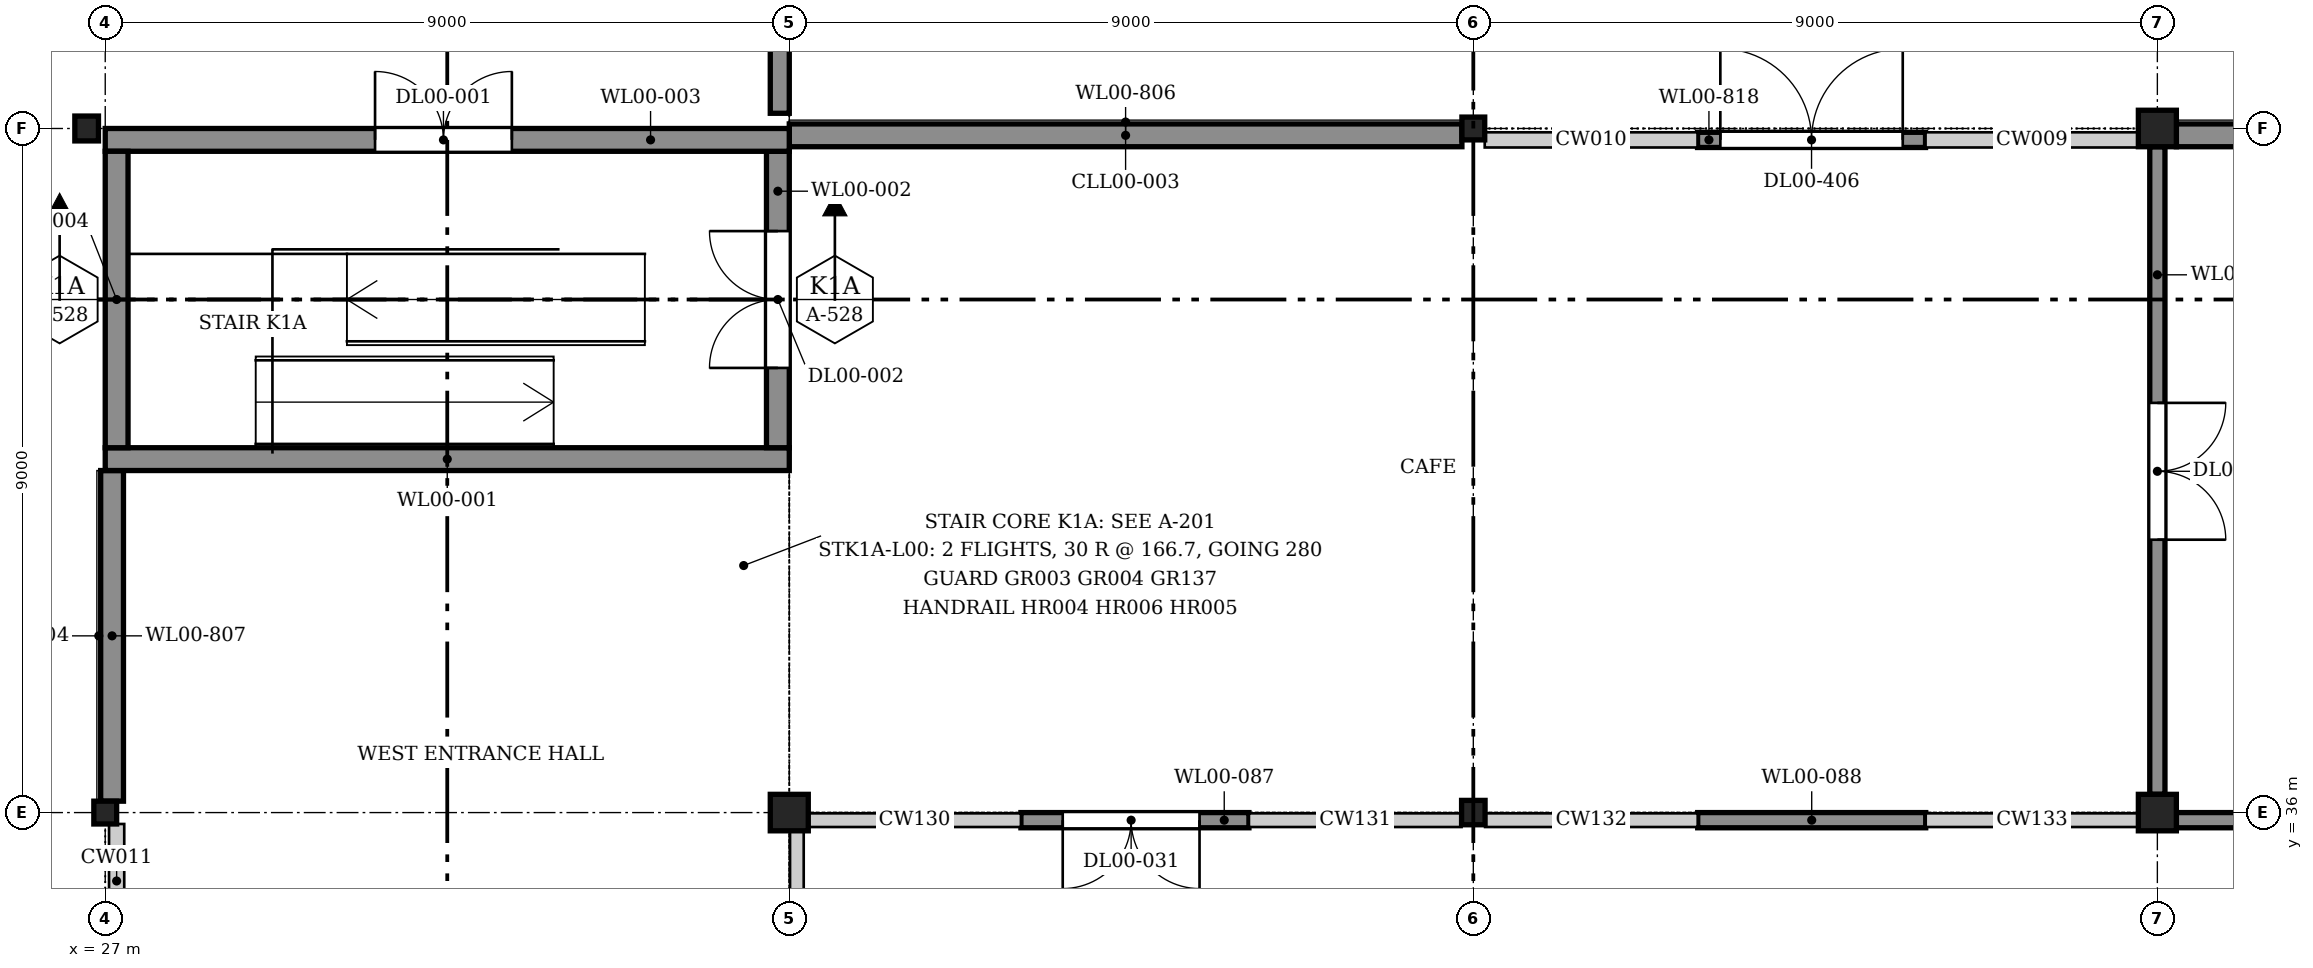
"""IFC4 building model, lengths in metres.
Left out: names, types, materials, properties, quantities, classifications, styles, units other than length and angle.
Written with IfcOpenShell. Run it as: python <this file> out.ifc"""

import sys

from ifc_helpers import new_model, si_unit, direction, frame, frame_2d, origin, origin_2d, place, context, subcontext, project, spatial, rectangle, hollow_rectangle, i_section, extrude, element, fill, save


model = new_model("IFC4")
c1 = context("Model", 3, precision=1e-05, world=origin(), true_north=direction((0.0, 1.0)))
c2 = subcontext(c1, "Body", "Model", "MODEL_VIEW")
j1 = project(units=[si_unit("LENGTHUNIT", "METRE"), si_unit("PLANEANGLEUNIT", "RADIAN")], contexts=[c1])
p1 = place(None, origin())
s1 = spatial("IfcSite", under=j1, at=p1, CompositionType="ELEMENT")
p2 = place(p1, origin())
s2 = spatial("IfcBuilding", under=s1, at=p2, CompositionType="ELEMENT")
p3 = place(p2, origin())
s3 = spatial("IfcBuildingStorey", under=s2, at=p3, CompositionType="ELEMENT", Elevation=0.0)
p4 = place(p3, frame((27.0, 36.0, 0.0), z_axis=(0.0, 0.0, 1.0), x_axis=(1.0, 0.0, 0.0)))
e1 = element("IfcColumn", 1, at=p4, inside=s3, PredefinedType="COLUMN", context=c2, shape_type="SweptSolid", body=[
    extrude(hollow_rectangle(XDim=0.3, YDim=0.3, WallThickness=0.016, InnerFilletRadius=0.024, OuterFilletRadius=0.04, at=origin_2d()), origin(), (0.0, 0.0, 1.0), 5.0),
])
p5 = place(p3, frame((36.0, 36.0, 0.0), z_axis=(0.0, 0.0, 1.0), x_axis=(1.0, 0.0, 0.0)))
e2 = element("IfcColumn", 2, at=p5, inside=s3, PredefinedType="COLUMN", context=c2, shape_type="SweptSolid", body=[
    extrude(i_section(OverallWidth=0.5, OverallDepth=0.48, WebThickness=0.04, FlangeThickness=0.04, at=origin_2d()), origin(), (0.0, 0.0, 1.0), 5.0),
])
p6 = place(p3, frame((45.0, 36.0, 0.0), z_axis=(0.0, 0.0, 1.0), x_axis=(1.0, 0.0, 0.0)))
e3 = element("IfcColumn", 3, at=p6, inside=s3, PredefinedType="COLUMN", context=c2, shape_type="SweptSolid", body=[
    extrude(i_section(OverallWidth=0.309, OverallDepth=0.321, WebThickness=0.014, FlangeThickness=0.022, FilletRadius=0.017, at=origin_2d()), origin(), (0.0, 0.0, 1.0), 5.0),
])
p7 = place(p3, frame((54.0, 36.0, 0.0), z_axis=(0.0, 0.0, 1.0), x_axis=(1.0, 0.0, 0.0)))
e4 = element("IfcColumn", 4, at=p7, inside=s3, PredefinedType="COLUMN", context=c2, shape_type="SweptSolid", body=[
    extrude(i_section(OverallWidth=0.5, OverallDepth=0.48, WebThickness=0.04, FlangeThickness=0.04, at=origin_2d()), origin(), (0.0, 0.0, 1.0), 5.0),
])
p8 = place(p3, frame((45.0, 45.0, 0.0), z_axis=(0.0, 0.0, 1.0), x_axis=(1.0, 0.0, 0.0)))
e5 = element("IfcColumn", 5, at=p8, inside=s3, PredefinedType="COLUMN", context=c2, shape_type="SweptSolid", body=[
    extrude(hollow_rectangle(XDim=0.3, YDim=0.3, WallThickness=0.016, InnerFilletRadius=0.024, OuterFilletRadius=0.04, at=origin_2d()), origin(), (0.0, 0.0, 1.0), 5.0),
])
p9 = place(p3, frame((54.0, 45.0, 0.0), z_axis=(0.0, 0.0, 1.0), x_axis=(1.0, 0.0, 0.0)))
e6 = element("IfcColumn", 6, at=p9, inside=s3, PredefinedType="COLUMN", context=c2, shape_type="SweptSolid", body=[
    extrude(i_section(OverallWidth=0.5, OverallDepth=0.48, WebThickness=0.04, FlangeThickness=0.04, at=origin_2d()), origin(), (0.0, 0.0, 1.0), 5.0),
])
p10 = place(p3, frame((26.756, 45.0, 0.0), z_axis=(0.0, 0.0, 1.0), x_axis=(1.0, 0.0, 0.0)))
e7 = element("IfcColumn", 7, at=p10, inside=s3, PredefinedType="COLUMN", context=c2, shape_type="SweptSolid", body=[
    extrude(i_section(OverallWidth=0.311, OverallDepth=0.327, WebThickness=0.016, FlangeThickness=0.025, FilletRadius=0.017, at=origin_2d()), origin(), (0.0, 0.0, 1.0), 5.0),
])
p11 = place(p3, frame((54.25, 44.91, 0.0), z_axis=(0.0, 0.0, 1.0), x_axis=(1.0, 0.0, 0.0)))
e8 = element("IfcWall", 8, at=p11, inside=s3, PredefinedType="SOLIDWALL", context=c2, shape_type="SweptSolid", body=[
    extrude(rectangle(XDim=8.75, YDim=0.3, at=frame_2d((4.375, 0.0))), origin(), (0.0, 0.0, 1.0), 4.378),
])
p12 = place(p3, frame((36.0, 44.91, 0.0), z_axis=(0.0, 0.0, 1.0), x_axis=(1.0, 0.0, 0.0)))
e9 = element("IfcWall", 9, at=p12, inside=s3, PredefinedType="SOLIDWALL", context=c2, shape_type="SweptSolid", body=[
    extrude(rectangle(XDim=8.85, YDim=0.3, at=frame_2d((4.425, 0.0))), origin(), (0.0, 0.0, 1.0), 4.378),
])
p13 = place(p3, frame((27.09, 36.15, 0.0), z_axis=(0.0, 0.0, 1.0), x_axis=(0.0, 1.0, 0.0)))
e10 = element("IfcWall", 10, at=p13, inside=s3, PredefinedType="SOLIDWALL", context=c2, shape_type="SweptSolid", body=[
    extrude(rectangle(XDim=4.35, YDim=0.3, at=frame_2d((2.175, 0.0))), origin(), (0.0, 0.0, 1.0), 4.378),
])
p14 = place(p3, frame((47.95, 44.85, 0.0), z_axis=(0.0, 0.0, 1.0), x_axis=(1.0, 0.0, 0.0)))
e11 = element("IfcWall", 11, at=p14, inside=s3, PredefinedType="SOLIDWALL", context=c2, shape_type="SweptSolid", body=[
    extrude(rectangle(XDim=3.0, YDim=0.2, at=frame_2d((1.5, 0.0))), origin(), (0.0, 0.0, 1.0), 4.835),
])
p15 = place(p14, frame((0.3, 0.0, 0.0)))
e12 = element("IfcOpeningElement", 12, at=p15, cuts=e11, PredefinedType="OPENING", context=c2, shape_type="SweptSolid", body=[
    extrude(rectangle(XDim=2.4, YDim=2.4, at=frame_2d((1.2, 1.2))), frame((0.0, 0.11, 0.0), z_axis=(0.0, -1.0, 0.0), x_axis=(1.0, 0.0, 0.0)), (0.0, 0.0, 1.0), 0.22),
])
p16 = place(p3, frame((35.875, 45.2, -0.7), z_axis=(0.0, 0.0, 1.0), x_axis=(0.0, 1.0, 0.0)))
e13 = element("IfcWall", 13, at=p16, inside=s3, PredefinedType="SOLIDWALL", context=c2, shape_type="SweptSolid", body=[
    extrude(rectangle(XDim=5.55, YDim=0.25, at=frame_2d((2.775, 0.0))), origin(), (0.0, 0.0, 1.0), 0.7),
])
p17 = place(p3, frame((27.0, 40.65, 0.0), z_axis=(0.0, 0.0, 1.0), x_axis=(1.0, 0.0, 0.0)))
e14 = element("IfcWall", 14, at=p17, inside=s3, PredefinedType="SOLIDWALL", context=c2, shape_type="SweptSolid", body=[
    extrude(rectangle(XDim=9.0, YDim=0.3, at=frame_2d((4.5, 0.0))), origin(), (0.0, 0.0, 1.0), 5.0),
])
p18 = place(p3, frame((35.85, 40.8, 0.0), z_axis=(0.0, 0.0, 1.0), x_axis=(0.0, 1.0, 0.0)))
e15 = element("IfcWall", 15, at=p18, inside=s3, PredefinedType="SOLIDWALL", context=c2, shape_type="SweptSolid", body=[
    extrude(rectangle(XDim=3.9, YDim=0.3, at=frame_2d((1.95, 0.0))), origin(), (0.0, 0.0, 1.0), 5.0),
])
p19 = place(p18, frame((1.05, 0.0, 0.0)))
e16 = element("IfcOpeningElement", 16, at=p19, cuts=e15, PredefinedType="OPENING", context=c2, shape_type="SweptSolid", body=[
    extrude(rectangle(XDim=1.8, YDim=2.1, at=frame_2d((0.9, 1.05))), frame((0.0, 0.16, 0.0), z_axis=(0.0, -1.0, 0.0), x_axis=(1.0, 0.0, 0.0)), (0.0, 0.0, 1.0), 0.32),
])
p20 = place(p3, frame((27.0, 44.85, 0.0), z_axis=(0.0, 0.0, 1.0), x_axis=(1.0, 0.0, 0.0)))
e17 = element("IfcWall", 17, at=p20, inside=s3, PredefinedType="SOLIDWALL", context=c2, shape_type="SweptSolid", body=[
    extrude(rectangle(XDim=9.0, YDim=0.3, at=frame_2d((4.5, 0.0))), origin(), (0.0, 0.0, 1.0), 5.0),
])
p21 = place(p20, frame((3.55, 0.0, 0.0)))
e18 = element("IfcOpeningElement", 18, at=p21, cuts=e17, PredefinedType="OPENING", context=c2, shape_type="SweptSolid", body=[
    extrude(rectangle(XDim=1.8, YDim=2.1, at=frame_2d((0.9, 1.05))), frame((0.0, 0.16, 0.0), z_axis=(0.0, -1.0, 0.0), x_axis=(1.0, 0.0, 0.0)), (0.0, 0.0, 1.0), 0.32),
])
p22 = place(p3, frame((27.15, 40.8, 0.0), z_axis=(0.0, 0.0, 1.0), x_axis=(0.0, 1.0, 0.0)))
e19 = element("IfcWall", 19, at=p22, inside=s3, PredefinedType="SOLIDWALL", context=c2, shape_type="SweptSolid", body=[
    extrude(rectangle(XDim=3.9, YDim=0.3, at=frame_2d((1.95, 0.0))), origin(), (0.0, 0.0, 1.0), 5.0),
])
p23 = place(p3, frame((39.048, 35.9, 0.0), z_axis=(0.0, 0.0, 1.0), x_axis=(1.0, 0.0, 0.0)))
e20 = element("IfcWall", 20, at=p23, inside=s3, PredefinedType="PARTITIONING", context=c2, shape_type="SweptSolid", body=[
    extrude(rectangle(XDim=3.0, YDim=0.2, at=frame_2d((1.5, 0.0))), origin(), (0.0, 0.0, 1.0), 4.228),
])
p24 = place(p23, frame((0.55, 0.0, 0.0)))
e21 = element("IfcOpeningElement", 21, at=p24, cuts=e20, PredefinedType="OPENING", context=c2, shape_type="SweptSolid", body=[
    extrude(rectangle(XDim=1.8, YDim=2.4, at=frame_2d((0.9, 1.2))), frame((0.0, 0.11, 0.0), z_axis=(0.0, -1.0, 0.0), x_axis=(1.0, 0.0, 0.0)), (0.0, 0.0, 1.0), 0.22),
])
p25 = place(p3, frame((47.952, 35.9, 0.0), z_axis=(0.0, 0.0, 1.0), x_axis=(1.0, 0.0, 0.0)))
e22 = element("IfcWall", 22, at=p25, inside=s3, PredefinedType="PARTITIONING", context=c2, shape_type="SweptSolid", body=[
    extrude(rectangle(XDim=3.0, YDim=0.2, at=frame_2d((1.5, 0.0))), origin(), (0.0, 0.0, 1.0), 4.228),
])
p26 = place(p3, frame((54.25, 35.9, 0.0), z_axis=(0.0, 0.0, 1.0), x_axis=(1.0, 0.0, 0.0)))
e23 = element("IfcWall", 23, at=p26, inside=s3, PredefinedType="PARTITIONING", context=c2, shape_type="SweptSolid", body=[
    extrude(rectangle(XDim=8.594, YDim=0.2, at=frame_2d((4.297, 0.0))), origin(), (0.0, 0.0, 1.0), 4.228),
])
p27 = place(p3, frame((54.0, 36.24, 0.0), z_axis=(0.0, 0.0, 1.0), x_axis=(0.0, 1.0, 0.0)))
e24 = element("IfcWall", 24, at=p27, inside=s3, PredefinedType="PARTITIONING", context=c2, shape_type="SweptSolid", body=[
    extrude(rectangle(XDim=8.52, YDim=0.2, at=frame_2d((4.26, 0.0))), origin(), (0.0, 0.0, 1.0), 4.302),
])
p28 = place(p27, frame((3.35, 0.0, 0.0)))
e25 = element("IfcOpeningElement", 25, at=p28, cuts=e24, PredefinedType="OPENING", context=c2, shape_type="SweptSolid", body=[
    extrude(rectangle(XDim=1.8, YDim=2.1, at=frame_2d((0.9, 1.05))), frame((0.0, 0.11, 0.0), z_axis=(0.0, -1.0, 0.0), x_axis=(1.0, 0.0, 0.0)), (0.0, 0.0, 1.0), 0.22),
])
p29 = place(p15, origin())
e26 = element("IfcDoor", 26, at=p29, inside=s3, OperationType="DOUBLE_DOOR_SINGLE_SWING", PredefinedType="DOOR", context=c2, shape_type="SweptSolid", body=[
    extrude(rectangle(XDim=2.4, YDim=2.4, at=frame_2d((1.2, 1.2))), frame((0.0, 0.025, 0.0), z_axis=(0.0, -1.0, 0.0), x_axis=(1.0, 0.0, 0.0)), (0.0, 0.0, 1.0), 0.05),
])
fill(e12, e26)
p30 = place(p21, origin())
e27 = element("IfcDoor", 27, at=p30, inside=s3, OperationType="DOUBLE_DOOR_SINGLE_SWING", PredefinedType="DOOR", context=c2, shape_type="SweptSolid", body=[
    extrude(rectangle(XDim=1.8, YDim=2.1, at=frame_2d((0.9, 1.05))), frame((0.0, 0.025, 0.0), z_axis=(0.0, -1.0, 0.0), x_axis=(1.0, 0.0, 0.0)), (0.0, 0.0, 1.0), 0.05),
])
fill(e18, e27)
p31 = place(p19, origin())
e28 = element("IfcDoor", 28, at=p31, inside=s3, OperationType="DOUBLE_DOOR_SINGLE_SWING", PredefinedType="DOOR", context=c2, shape_type="SweptSolid", body=[
    extrude(rectangle(XDim=1.8, YDim=2.1, at=frame_2d((0.9, 1.05))), frame((0.0, 0.025, 0.0), z_axis=(0.0, -1.0, 0.0), x_axis=(1.0, 0.0, 0.0)), (0.0, 0.0, 1.0), 0.05),
])
fill(e16, e28)
p32 = place(p24, frame((1.8, 0.0, 0.0), z_axis=(0.0, 0.0, 1.0), x_axis=(-1.0, 0.0, 0.0)))
e29 = element("IfcDoor", 29, at=p32, inside=s3, OperationType="DOUBLE_DOOR_SINGLE_SWING", PredefinedType="DOOR", context=c2, shape_type="SweptSolid", body=[
    extrude(rectangle(XDim=1.8, YDim=2.4, at=frame_2d((0.9, 1.2))), frame((0.0, 0.025, 0.0), z_axis=(0.0, -1.0, 0.0), x_axis=(1.0, 0.0, 0.0)), (0.0, 0.0, 1.0), 0.05),
])
fill(e21, e29)
p33 = place(p28, frame((1.8, 0.0, 0.0), z_axis=(0.0, 0.0, 1.0), x_axis=(-1.0, 0.0, 0.0)))
e30 = element("IfcDoor", 30, at=p33, inside=s3, OperationType="DOUBLE_DOOR_SINGLE_SWING", PredefinedType="DOOR", context=c2, shape_type="SweptSolid", body=[
    extrude(rectangle(XDim=1.8, YDim=2.1, at=frame_2d((0.9, 1.05))), frame((0.0, 0.025, 0.0), z_axis=(0.0, -1.0, 0.0), x_axis=(1.0, 0.0, 0.0)), (0.0, 0.0, 1.0), 0.05),
])
fill(e25, e30)
save(model, sys.argv[1])
